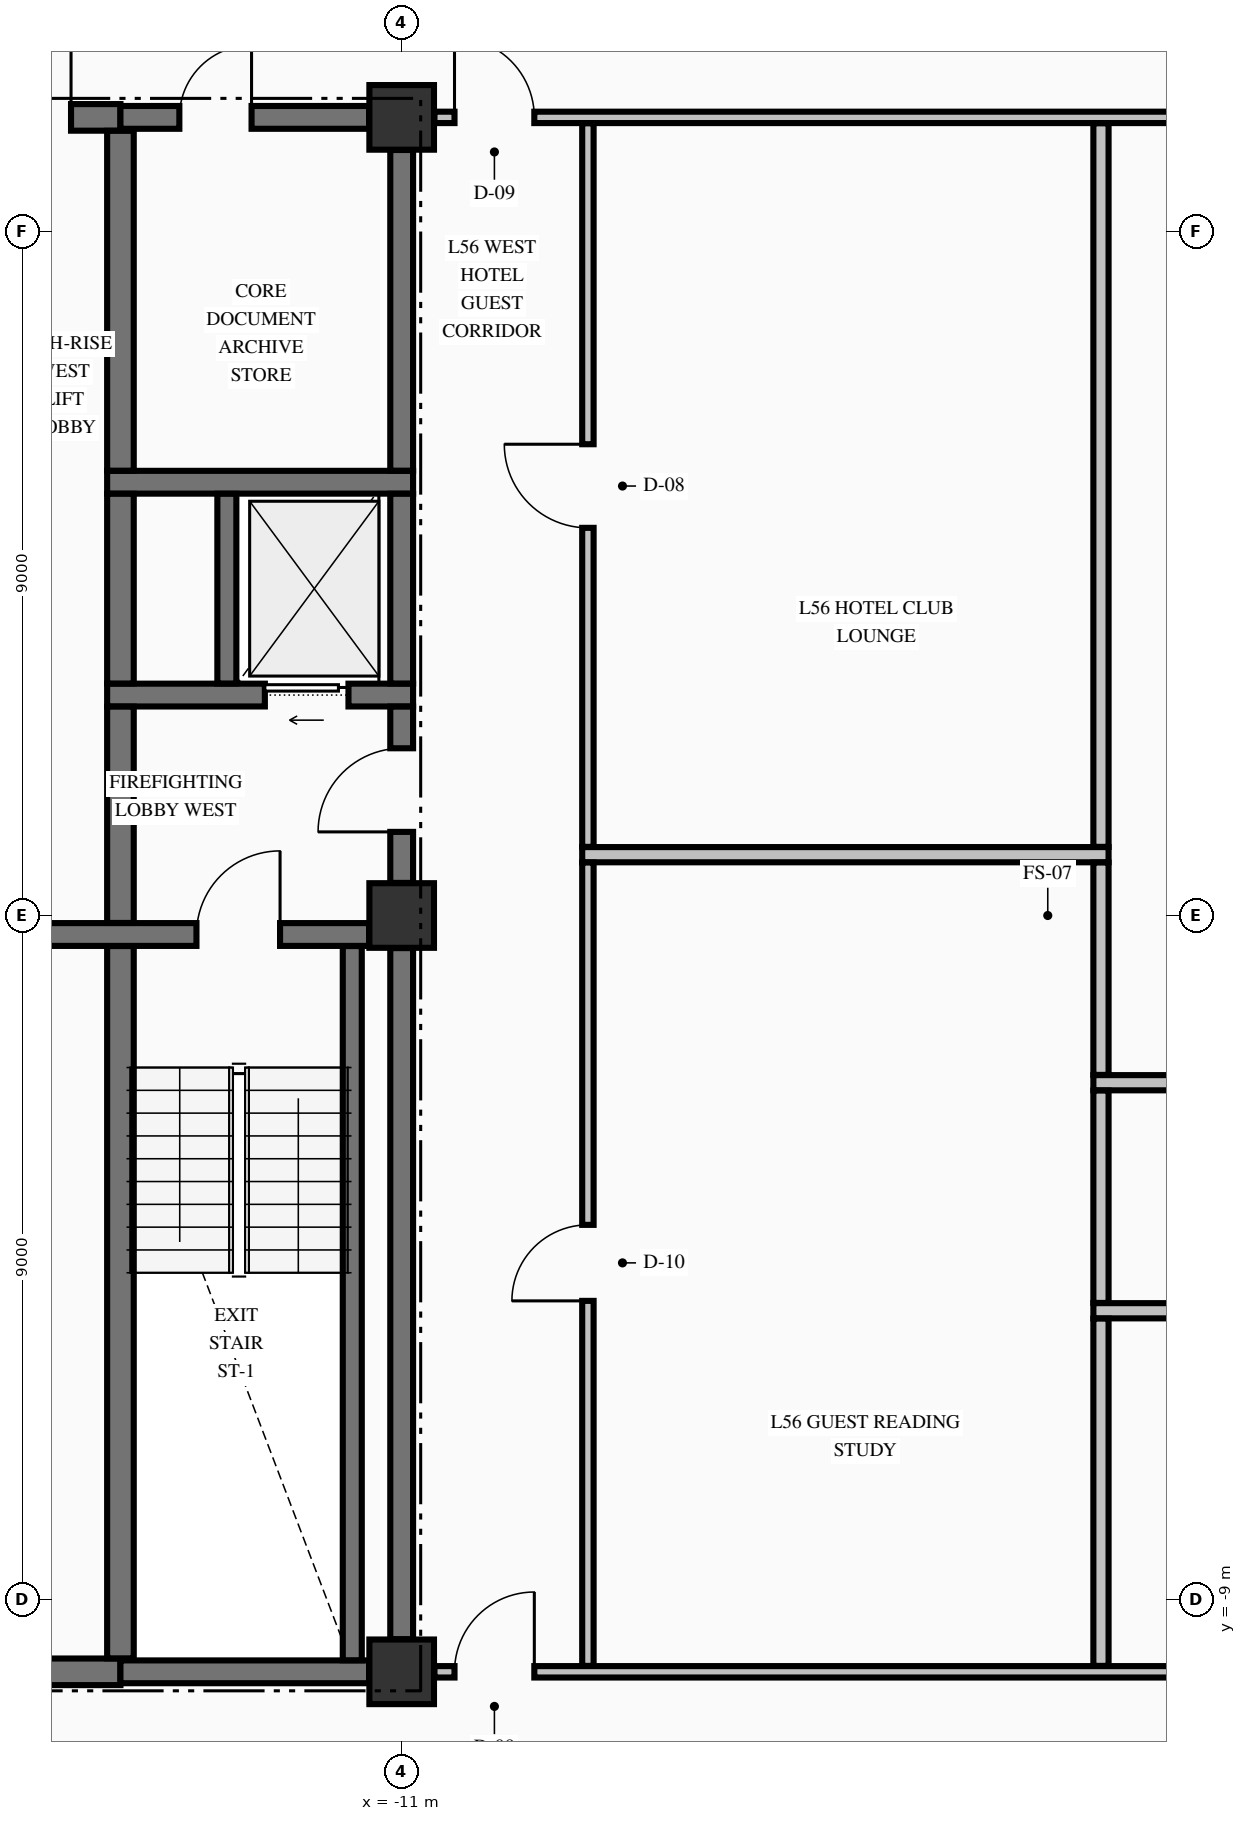
"""IFC4 building model, lengths in metres.
Left out: names, types, materials, properties, quantities, classifications, styles, units other than length and angle.
Written with IfcOpenShell. Run it as: python <this file> out.ifc"""

import sys

from ifc_helpers import new_model, si_unit, direction, frame, frame_2d, origin, origin_2d, place, context, subcontext, project, spatial, rectangle, extrude, element, fill, save


model = new_model("IFC4")
c1 = context("Model", 3, precision=1e-05, world=origin(), true_north=direction((0.0, 1.0)))
c2 = subcontext(c1, "Body", "Model", "MODEL_VIEW")
j1 = project(units=[si_unit("LENGTHUNIT", "METRE"), si_unit("PLANEANGLEUNIT", "RADIAN")], contexts=[c1])
p1 = place(None, origin())
s1 = spatial("IfcSite", under=j1, at=p1, CompositionType="ELEMENT")
p2 = place(p1, origin())
s2 = spatial("IfcBuilding", under=s1, at=p2, CompositionType="ELEMENT")
p3 = place(p2, frame((0.0, 0.0, 215.26)))
s3 = spatial("IfcBuildingStorey", under=s2, at=p3, CompositionType="ELEMENT", Elevation=215.26)
for number, where, z_axis, x_axis in (
    (1, (-11.0, -9.95, -0.25), (0.0, 0.0, 1.0), (1.0, 0.0, 0.0)),
    (2, (-11.0, 0.0, -0.25), (0.0, 0.0, 1.0), (1.0, 0.0, 0.0)),
    (3, (-11.0, 10.5, -0.25), (0.0, 0.0, 1.0), (1.0, 0.0, 0.0)),
):
    element("IfcColumn", number, at=place(p3, frame(where, z_axis=z_axis, x_axis=x_axis)), inside=s3, PredefinedType="COLUMN", context=c2, shape_type="SweptSolid", body=[
        extrude(rectangle(XDim=0.85, YDim=0.85, at=origin_2d()), origin(), (0.0, 0.0, 1.0), 3.4),
    ])
p4 = place(p3, frame((-19.571, -9.95, 0.0), z_axis=(0.0, 0.0, 1.0), x_axis=(1.0, 0.0, 0.0)))
e4 = element("IfcWall", 4, at=p4, inside=s3, PredefinedType="SHEAR", context=c2, shape_type="SweptSolid", body=[
    extrude(rectangle(XDim=4.871, YDim=0.35, at=frame_2d((2.436, 0.0))), origin(), (0.0, 0.0, 1.0), 3.15),
])
p5 = place(p4, frame((0.746, 0.0, 0.0)))
e5 = element("IfcOpeningElement", 5, at=p5, cuts=e4, PredefinedType="OPENING", context=c2, shape_type="SweptSolid", body=[
    extrude(rectangle(XDim=1.05, YDim=2.15, at=frame_2d((0.525, 1.075))), frame((0.0, 0.185, 0.0), z_axis=(0.0, -1.0, 0.0), x_axis=(1.0, 0.0, 0.0)), (0.0, 0.0, 1.0), 0.37),
])
p6 = place(p3, frame((-14.7, -9.95, 0.0), z_axis=(0.0, 0.0, 1.0), x_axis=(1.0, 0.0, 0.0)))
e6 = element("IfcWall", 6, at=p6, inside=s3, PredefinedType="SHEAR", context=c2, shape_type="SweptSolid", body=[
    extrude(rectangle(XDim=3.271, YDim=0.3, at=frame_2d((1.635, 0.0))), origin(), (0.0, 0.0, 1.0), 3.15),
])
p7 = place(p3, frame((-19.571, -0.25, 0.0), z_axis=(0.0, 0.0, 1.0), x_axis=(1.0, 0.0, 0.0)))
e7 = element("IfcWall", 7, at=p7, inside=s3, PredefinedType="SHEAR", context=c2, shape_type="SweptSolid", body=[
    extrude(rectangle(XDim=8.142, YDim=0.3, at=frame_2d((4.071, 0.0))), origin(), (0.0, 0.0, 1.0), 3.15),
])
p8 = place(p7, frame((5.871, 0.0, 0.0)))
e8 = element("IfcOpeningElement", 8, at=p8, cuts=e7, PredefinedType="OPENING", context=c2, shape_type="SweptSolid", body=[
    extrude(rectangle(XDim=1.1, YDim=2.15, at=frame_2d((0.55, 1.075))), frame((0.0, 0.16, 0.0), z_axis=(0.0, -1.0, 0.0), x_axis=(1.0, 0.0, 0.0)), (0.0, 0.0, 1.0), 0.32),
])
p9 = place(p3, frame((-14.875, 2.9, 0.0), z_axis=(0.0, 0.0, 1.0), x_axis=(1.0, 0.0, 0.0)))
e9 = element("IfcWall", 9, at=p9, inside=s3, PredefinedType="SHEAR", context=c2, shape_type="SweptSolid", body=[
    extrude(rectangle(XDim=4.025, YDim=0.3, at=frame_2d((2.012, 0.0))), origin(), (0.0, 0.0, 1.0), 3.15),
])
p10 = place(p9, frame((2.075, 0.0, 0.0)))
e10 = element("IfcOpeningElement", 10, at=p10, cuts=e9, PredefinedType="OPENING", context=c2, shape_type="SweptSolid", body=[
    extrude(rectangle(XDim=1.1, YDim=2.2, at=frame_2d((0.55, 1.1))), frame((0.0, 0.16, 0.0), z_axis=(0.0, -1.0, 0.0), x_axis=(1.0, 0.0, 0.0)), (0.0, 0.0, 1.0), 0.32),
])
p11 = place(p3, frame((-14.875, 5.7, 0.0), z_axis=(0.0, 0.0, 1.0), x_axis=(1.0, 0.0, 0.0)))
e11 = element("IfcWall", 11, at=p11, inside=s3, PredefinedType="SHEAR", context=c2, shape_type="SweptSolid", body=[
    extrude(rectangle(XDim=4.025, YDim=0.3, at=frame_2d((2.012, 0.0))), origin(), (0.0, 0.0, 1.0), 3.15),
])
p12 = place(p3, frame((-19.571, 10.5, 0.0), z_axis=(0.0, 0.0, 1.0), x_axis=(1.0, 0.0, 0.0)))
e12 = element("IfcWall", 12, at=p12, inside=s3, PredefinedType="SHEAR", context=c2, shape_type="SweptSolid", body=[
    extrude(rectangle(XDim=4.871, YDim=0.35, at=frame_2d((2.436, 0.0))), origin(), (0.0, 0.0, 1.0), 3.15),
])
p13 = place(p12, frame((3.121, 0.0, 0.0)))
e13 = element("IfcOpeningElement", 13, at=p13, cuts=e12, PredefinedType="OPENING", context=c2, shape_type="SweptSolid", body=[
    extrude(rectangle(XDim=1.1, YDim=2.15, at=frame_2d((0.55, 1.075))), frame((0.0, 0.185, 0.0), z_axis=(0.0, -1.0, 0.0), x_axis=(1.0, 0.0, 0.0)), (0.0, 0.0, 1.0), 0.37),
])
p14 = place(p3, frame((-14.7, 10.5, 0.0), z_axis=(0.0, 0.0, 1.0), x_axis=(1.0, 0.0, 0.0)))
e14 = element("IfcWall", 14, at=p14, inside=s3, PredefinedType="SHEAR", context=c2, shape_type="SweptSolid", body=[
    extrude(rectangle(XDim=3.271, YDim=0.3, at=frame_2d((1.635, 0.0))), origin(), (0.0, 0.0, 1.0), 3.15),
])
p15 = place(p14, frame((0.775, 0.0, 0.0)))
e15 = element("IfcOpeningElement", 15, at=p15, cuts=e14, PredefinedType="OPENING", context=c2, shape_type="SweptSolid", body=[
    extrude(rectangle(XDim=0.95, YDim=2.15, at=frame_2d((0.475, 1.075))), frame((0.0, 0.16, 0.0), z_axis=(0.0, -1.0, 0.0), x_axis=(1.0, 0.0, 0.0)), (0.0, 0.0, 1.0), 0.32),
])
p16 = place(p3, frame((-10.569, -9.95, 0.0), z_axis=(0.0, 0.0, 1.0), x_axis=(1.0, 0.0, 0.0)))
e16 = element("IfcWall", 16, at=p16, inside=s3, PredefinedType="PARTITIONING", context=c2, shape_type="SweptSolid", body=[
    extrude(rectangle(XDim=21.138, YDim=0.15, at=frame_2d((10.569, 0.0))), origin(), (0.0, 0.0, 1.0), 3.15),
])
p17 = place(p16, frame((0.264, 0.0, 0.0)))
e17 = element("IfcOpeningElement", 17, at=p17, cuts=e16, PredefinedType="OPENING", context=c2, shape_type="SweptSolid", body=[
    extrude(rectangle(XDim=1.05, YDim=2.15, at=frame_2d((0.525, 1.075))), frame((0.0, 0.085, 0.0), z_axis=(0.0, -1.0, 0.0), x_axis=(1.0, 0.0, 0.0)), (0.0, 0.0, 1.0), 0.17),
])
p18 = place(p16, frame((19.824, 0.0, 0.0)))
e18 = element("IfcOpeningElement", 18, at=p18, cuts=e16, PredefinedType="OPENING", context=c2, shape_type="SweptSolid", body=[
    extrude(rectangle(XDim=1.05, YDim=2.15, at=frame_2d((0.525, 1.075))), frame((0.0, 0.085, 0.0), z_axis=(0.0, -1.0, 0.0), x_axis=(1.0, 0.0, 0.0)), (0.0, 0.0, 1.0), 0.17),
])
p19 = place(p16, frame((11.974, 0.0, 0.0)))
e19 = element("IfcOpeningElement", 19, at=p19, cuts=e16, PredefinedType="OPENING", context=c2, shape_type="SweptSolid", body=[
    extrude(rectangle(XDim=0.95, YDim=2.15, at=frame_2d((0.475, 1.075))), frame((0.0, 0.085, 0.0), z_axis=(0.0, -1.0, 0.0), x_axis=(1.0, 0.0, 0.0)), (0.0, 0.0, 1.0), 0.17),
])
for number, where, z_axis, x_axis in (
    (20, (-1.9, -5.2, 0.0), (0.0, 0.0, 1.0), (1.0, 0.0, 0.0)),
    (21, (-1.9, -2.2, 0.0), (0.0, 0.0, 1.0), (1.0, 0.0, 0.0)),
):
    element("IfcWall", number, at=place(p3, frame(where, z_axis=z_axis, x_axis=x_axis)), inside=s3, PredefinedType="PARTITIONING", context=c2, shape_type="SweptSolid", body=[
        extrude(rectangle(XDim=10.525, YDim=0.2, at=frame_2d((5.262, 0.0))), origin(), (0.0, 0.0, 1.0), 3.15),
    ])
p20 = place(p3, frame((-8.625, 0.8, 0.0), z_axis=(0.0, 0.0, 1.0), x_axis=(1.0, 0.0, 0.0)))
e22 = element("IfcWall", 22, at=p20, inside=s3, PredefinedType="PARTITIONING", context=c2, shape_type="SweptSolid", body=[
    extrude(rectangle(XDim=6.925, YDim=0.2, at=frame_2d((3.462, 0.0))), origin(), (0.0, 0.0, 1.0), 3.15),
])
p21 = place(p3, frame((-10.569, 10.5, 0.0), z_axis=(0.0, 0.0, 1.0), x_axis=(1.0, 0.0, 0.0)))
e23 = element("IfcWall", 23, at=p21, inside=s3, PredefinedType="PARTITIONING", context=c2, shape_type="SweptSolid", body=[
    extrude(rectangle(XDim=21.138, YDim=0.15, at=frame_2d((10.569, 0.0))), origin(), (0.0, 0.0, 1.0), 3.15),
])
p22 = place(p21, frame((0.264, 0.0, 0.0)))
e24 = element("IfcOpeningElement", 24, at=p22, cuts=e23, PredefinedType="OPENING", context=c2, shape_type="SweptSolid", body=[
    extrude(rectangle(XDim=1.05, YDim=2.15, at=frame_2d((0.525, 1.075))), frame((0.0, 0.085, 0.0), z_axis=(0.0, -1.0, 0.0), x_axis=(1.0, 0.0, 0.0)), (0.0, 0.0, 1.0), 0.17),
])
p23 = place(p21, frame((19.824, 0.0, 0.0)))
e25 = element("IfcOpeningElement", 25, at=p23, cuts=e23, PredefinedType="OPENING", context=c2, shape_type="SweptSolid", body=[
    extrude(rectangle(XDim=1.05, YDim=2.15, at=frame_2d((0.525, 1.075))), frame((0.0, 0.085, 0.0), z_axis=(0.0, -1.0, 0.0), x_axis=(1.0, 0.0, 0.0)), (0.0, 0.0, 1.0), 0.17),
])
p24 = place(p3, frame((-14.7, -9.773, 0.0), z_axis=(0.0, 0.0, 1.0), x_axis=(0.0, 1.0, 0.0)))
e26 = element("IfcWall", 26, at=p24, inside=s3, PredefinedType="SHEAR", context=c2, shape_type="SweptSolid", body=[
    extrude(rectangle(XDim=9.371, YDim=0.35, at=frame_2d((4.686, 0.0))), origin(), (0.0, 0.0, 1.0), 3.15),
])
p25 = place(p3, frame((-14.7, -0.098, 0.0), z_axis=(0.0, 0.0, 1.0), x_axis=(0.0, 1.0, 0.0)))
e27 = element("IfcWall", 27, at=p25, inside=s3, PredefinedType="SHEAR", context=c2, shape_type="SweptSolid", body=[
    extrude(rectangle(XDim=2.846, YDim=0.35, at=frame_2d((1.423, 0.0))), origin(), (0.0, 0.0, 1.0), 3.15),
])
p26 = place(p3, frame((-14.7, 3.052, 0.0), z_axis=(0.0, 0.0, 1.0), x_axis=(0.0, 1.0, 0.0)))
e28 = element("IfcWall", 28, at=p26, inside=s3, PredefinedType="SHEAR", context=c2, shape_type="SweptSolid", body=[
    extrude(rectangle(XDim=2.496, YDim=0.35, at=frame_2d((1.248, 0.0))), origin(), (0.0, 0.0, 1.0), 3.15),
])
p27 = place(p3, frame((-14.7, 5.852, 0.0), z_axis=(0.0, 0.0, 1.0), x_axis=(0.0, 1.0, 0.0)))
e29 = element("IfcWall", 29, at=p27, inside=s3, PredefinedType="SHEAR", context=c2, shape_type="SweptSolid", body=[
    extrude(rectangle(XDim=4.471, YDim=0.35, at=frame_2d((2.235, 0.0))), origin(), (0.0, 0.0, 1.0), 3.15),
])
p28 = place(p3, frame((-13.3, 3.052, 0.0), z_axis=(0.0, 0.0, 1.0), x_axis=(0.0, 1.0, 0.0)))
e30 = element("IfcWall", 30, at=p28, inside=s3, PredefinedType="SOLIDWALL", context=c2, shape_type="SweptSolid", body=[
    extrude(rectangle(XDim=2.496, YDim=0.25, at=frame_2d((1.248, 0.0))), origin(), (0.0, 0.0, 1.0), 3.15),
])
p29 = place(p3, frame((-11.65, -9.798, 0.0), z_axis=(0.0, 0.0, 1.0), x_axis=(0.0, 1.0, 0.0)))
e31 = element("IfcWall", 31, at=p29, inside=s3, PredefinedType="SOLIDWALL", context=c2, shape_type="SweptSolid", body=[
    extrude(rectangle(XDim=9.396, YDim=0.25, at=frame_2d((4.698, 0.0))), origin(), (0.0, 0.0, 1.0), 3.15),
])
p30 = place(p3, frame((-11.0, -9.521, 0.0), z_axis=(0.0, 0.0, 1.0), x_axis=(0.0, 1.0, 0.0)))
e32 = element("IfcWall", 32, at=p30, inside=s3, PredefinedType="SHEAR", context=c2, shape_type="SweptSolid", body=[
    extrude(rectangle(XDim=9.092, YDim=0.3, at=frame_2d((4.546, 0.0))), origin(), (0.0, 0.0, 1.0), 3.15),
])
p31 = place(p3, frame((-11.0, 0.429, 0.0), z_axis=(0.0, 0.0, 1.0), x_axis=(0.0, 1.0, 0.0)))
e33 = element("IfcWall", 33, at=p31, inside=s3, PredefinedType="SHEAR", context=c2, shape_type="SweptSolid", body=[
    extrude(rectangle(XDim=2.319, YDim=0.3, at=frame_2d((1.16, 0.0))), origin(), (0.0, 0.0, 1.0), 3.15),
])
p32 = place(p31, frame((0.671, 0.0, 0.0)))
e34 = element("IfcOpeningElement", 34, at=p32, cuts=e33, PredefinedType="OPENING", context=c2, shape_type="SweptSolid", body=[
    extrude(rectangle(XDim=1.1, YDim=2.15, at=frame_2d((0.55, 1.075))), frame((0.0, 0.16, 0.0), z_axis=(0.0, -1.0, 0.0), x_axis=(1.0, 0.0, 0.0)), (0.0, 0.0, 1.0), 0.32),
])
p33 = place(p3, frame((-11.0, 3.052, 0.0), z_axis=(0.0, 0.0, 1.0), x_axis=(0.0, 1.0, 0.0)))
e35 = element("IfcWall", 35, at=p33, inside=s3, PredefinedType="SHEAR", context=c2, shape_type="SweptSolid", body=[
    extrude(rectangle(XDim=2.496, YDim=0.3, at=frame_2d((1.248, 0.0))), origin(), (0.0, 0.0, 1.0), 3.15),
])
p34 = place(p3, frame((-11.0, 5.852, 0.0), z_axis=(0.0, 0.0, 1.0), x_axis=(0.0, 1.0, 0.0)))
e36 = element("IfcWall", 36, at=p34, inside=s3, PredefinedType="SHEAR", context=c2, shape_type="SweptSolid", body=[
    extrude(rectangle(XDim=4.219, YDim=0.3, at=frame_2d((2.109, 0.0))), origin(), (0.0, 0.0, 1.0), 3.15),
])
p35 = place(p3, frame((-8.55, -9.872, 0.0), z_axis=(0.0, 0.0, 1.0), x_axis=(0.0, 1.0, 0.0)))
e37 = element("IfcWall", 37, at=p35, inside=s3, PredefinedType="PARTITIONING", context=c2, shape_type="SweptSolid", body=[
    extrude(rectangle(XDim=10.569, YDim=0.15, at=frame_2d((5.285, 0.0))), origin(), (0.0, 0.0, 1.0), 3.15),
])
p36 = place(p35, frame((4.802, 0.0, 0.0)))
e38 = element("IfcOpeningElement", 38, at=p36, cuts=e37, PredefinedType="OPENING", context=c2, shape_type="SweptSolid", body=[
    extrude(rectangle(XDim=1.0, YDim=2.15, at=frame_2d((0.5, 1.075))), frame((0.0, 0.085, 0.0), z_axis=(0.0, -1.0, 0.0), x_axis=(1.0, 0.0, 0.0)), (0.0, 0.0, 1.0), 0.17),
])
p37 = place(p3, frame((-8.55, 0.903, 0.0), z_axis=(0.0, 0.0, 1.0), x_axis=(0.0, 1.0, 0.0)))
e39 = element("IfcWall", 39, at=p37, inside=s3, PredefinedType="PARTITIONING", context=c2, shape_type="SweptSolid", body=[
    extrude(rectangle(XDim=9.519, YDim=0.15, at=frame_2d((4.76, 0.0))), origin(), (0.0, 0.0, 1.0), 3.15),
])
p38 = place(p37, frame((4.197, 0.0, 0.0)))
e40 = element("IfcOpeningElement", 40, at=p38, cuts=e39, PredefinedType="OPENING", context=c2, shape_type="SweptSolid", body=[
    extrude(rectangle(XDim=1.1, YDim=2.15, at=frame_2d((0.55, 1.075))), frame((0.0, 0.085, 0.0), z_axis=(0.0, -1.0, 0.0), x_axis=(1.0, 0.0, 0.0)), (0.0, 0.0, 1.0), 0.17),
])
p39 = place(p3, frame((-1.8, -9.872, 0.0), z_axis=(0.0, 0.0, 1.0), x_axis=(0.0, 1.0, 0.0)))
e41 = element("IfcWall", 41, at=p39, inside=s3, PredefinedType="PARTITIONING", context=c2, shape_type="SweptSolid", body=[
    extrude(rectangle(XDim=4.569, YDim=0.2, at=frame_2d((2.285, 0.0))), origin(), (0.0, 0.0, 1.0), 3.15),
])
for number, where, z_axis, x_axis in (
    (42, (-1.8, -5.097, 0.0), (0.0, 0.0, 1.0), (0.0, 1.0, 0.0)),
    (43, (-1.8, -2.097, 0.0), (0.0, 0.0, 1.0), (0.0, 1.0, 0.0)),
):
    element("IfcWall", number, at=place(p3, frame(where, z_axis=z_axis, x_axis=x_axis)), inside=s3, PredefinedType="PARTITIONING", context=c2, shape_type="SweptSolid", body=[
        extrude(rectangle(XDim=2.794, YDim=0.2, at=frame_2d((1.397, 0.0))), origin(), (0.0, 0.0, 1.0), 3.15),
    ])
p40 = place(p3, frame((-1.8, 0.903, 0.0), z_axis=(0.0, 0.0, 1.0), x_axis=(0.0, 1.0, 0.0)))
e44 = element("IfcWall", 44, at=p40, inside=s3, PredefinedType="PARTITIONING", context=c2, shape_type="SweptSolid", body=[
    extrude(rectangle(XDim=9.519, YDim=0.2, at=frame_2d((4.76, 0.0))), origin(), (0.0, 0.0, 1.0), 3.15),
])
p41 = place(p8, origin())
e45 = element("IfcDoor", 45, at=p41, inside=s3, OperationType="SINGLE_SWING_RIGHT", PredefinedType="DOOR", context=c2, shape_type="SweptSolid", body=[
    extrude(rectangle(XDim=1.1, YDim=2.15, at=frame_2d((0.55, 1.075))), frame((0.0, 0.025, 0.0), z_axis=(0.0, -1.0, 0.0), x_axis=(1.0, 0.0, 0.0)), (0.0, 0.0, 1.0), 0.05),
])
fill(e8, e45)
p42 = place(p32, origin())
e46 = element("IfcDoor", 46, at=p42, inside=s3, OperationType="SINGLE_SWING_LEFT", PredefinedType="DOOR", context=c2, shape_type="SweptSolid", body=[
    extrude(rectangle(XDim=1.1, YDim=2.15, at=frame_2d((0.55, 1.075))), frame((0.0, 0.025, 0.0), z_axis=(0.0, -1.0, 0.0), x_axis=(1.0, 0.0, 0.0)), (0.0, 0.0, 1.0), 0.05),
])
fill(e34, e46)
p43 = place(p10, origin())
e47 = element("IfcDoor", 47, at=p43, inside=s3, OperationType="SLIDING_TO_LEFT", PredefinedType="DOOR", context=c2, shape_type="SweptSolid", body=[
    extrude(rectangle(XDim=1.1, YDim=2.2, at=frame_2d((0.55, 1.1))), frame((0.0, 0.025, 0.0), z_axis=(0.0, -1.0, 0.0), x_axis=(1.0, 0.0, 0.0)), (0.0, 0.0, 1.0), 0.05),
])
fill(e10, e47)
p44 = place(p15, origin())
e48 = element("IfcDoor", 48, at=p44, inside=s3, OperationType="SINGLE_SWING_RIGHT", PredefinedType="DOOR", context=c2, shape_type="SweptSolid", body=[
    extrude(rectangle(XDim=0.95, YDim=2.15, at=frame_2d((0.475, 1.075))), frame((0.0, 0.025, 0.0), z_axis=(0.0, -1.0, 0.0), x_axis=(1.0, 0.0, 0.0)), (0.0, 0.0, 1.0), 0.05),
])
fill(e15, e48)
p45 = place(p13, origin())
e49 = element("IfcDoor", 49, at=p45, inside=s3, OperationType="SINGLE_SWING_RIGHT", PredefinedType="DOOR", context=c2, shape_type="SweptSolid", body=[
    extrude(rectangle(XDim=1.1, YDim=2.15, at=frame_2d((0.55, 1.075))), frame((0.0, 0.025, 0.0), z_axis=(0.0, -1.0, 0.0), x_axis=(1.0, 0.0, 0.0)), (0.0, 0.0, 1.0), 0.05),
])
fill(e13, e49)
p46 = place(p22, origin())
e50 = element("IfcDoor", 50, at=p46, inside=s3, OperationType="SINGLE_SWING_LEFT", PredefinedType="DOOR", context=c2, shape_type="SweptSolid", body=[
    extrude(rectangle(XDim=1.05, YDim=2.15, at=frame_2d((0.525, 1.075))), frame((0.0, 0.025, 0.0), z_axis=(0.0, -1.0, 0.0), x_axis=(1.0, 0.0, 0.0)), (0.0, 0.0, 1.0), 0.05),
])
fill(e24, e50)
p47 = place(p17, origin())
e51 = element("IfcDoor", 51, at=p47, inside=s3, OperationType="SINGLE_SWING_RIGHT", PredefinedType="DOOR", context=c2, shape_type="SweptSolid", body=[
    extrude(rectangle(XDim=1.05, YDim=2.15, at=frame_2d((0.525, 1.075))), frame((0.0, 0.025, 0.0), z_axis=(0.0, -1.0, 0.0), x_axis=(1.0, 0.0, 0.0)), (0.0, 0.0, 1.0), 0.05),
])
fill(e17, e51)
p48 = place(p38, origin())
e52 = element("IfcDoor", 52, at=p48, inside=s3, OperationType="SINGLE_SWING_RIGHT", PredefinedType="DOOR", context=c2, shape_type="SweptSolid", body=[
    extrude(rectangle(XDim=1.1, YDim=2.15, at=frame_2d((0.55, 1.075))), frame((0.0, 0.025, 0.0), z_axis=(0.0, -1.0, 0.0), x_axis=(1.0, 0.0, 0.0)), (0.0, 0.0, 1.0), 0.05),
])
fill(e40, e52)
p49 = place(p36, origin())
e53 = element("IfcDoor", 53, at=p49, inside=s3, OperationType="SINGLE_SWING_LEFT", PredefinedType="DOOR", context=c2, shape_type="SweptSolid", body=[
    extrude(rectangle(XDim=1.0, YDim=2.15, at=frame_2d((0.5, 1.075))), frame((0.0, 0.025, 0.0), z_axis=(0.0, -1.0, 0.0), x_axis=(1.0, 0.0, 0.0)), (0.0, 0.0, 1.0), 0.05),
])
fill(e38, e53)
save(model, sys.argv[1])
